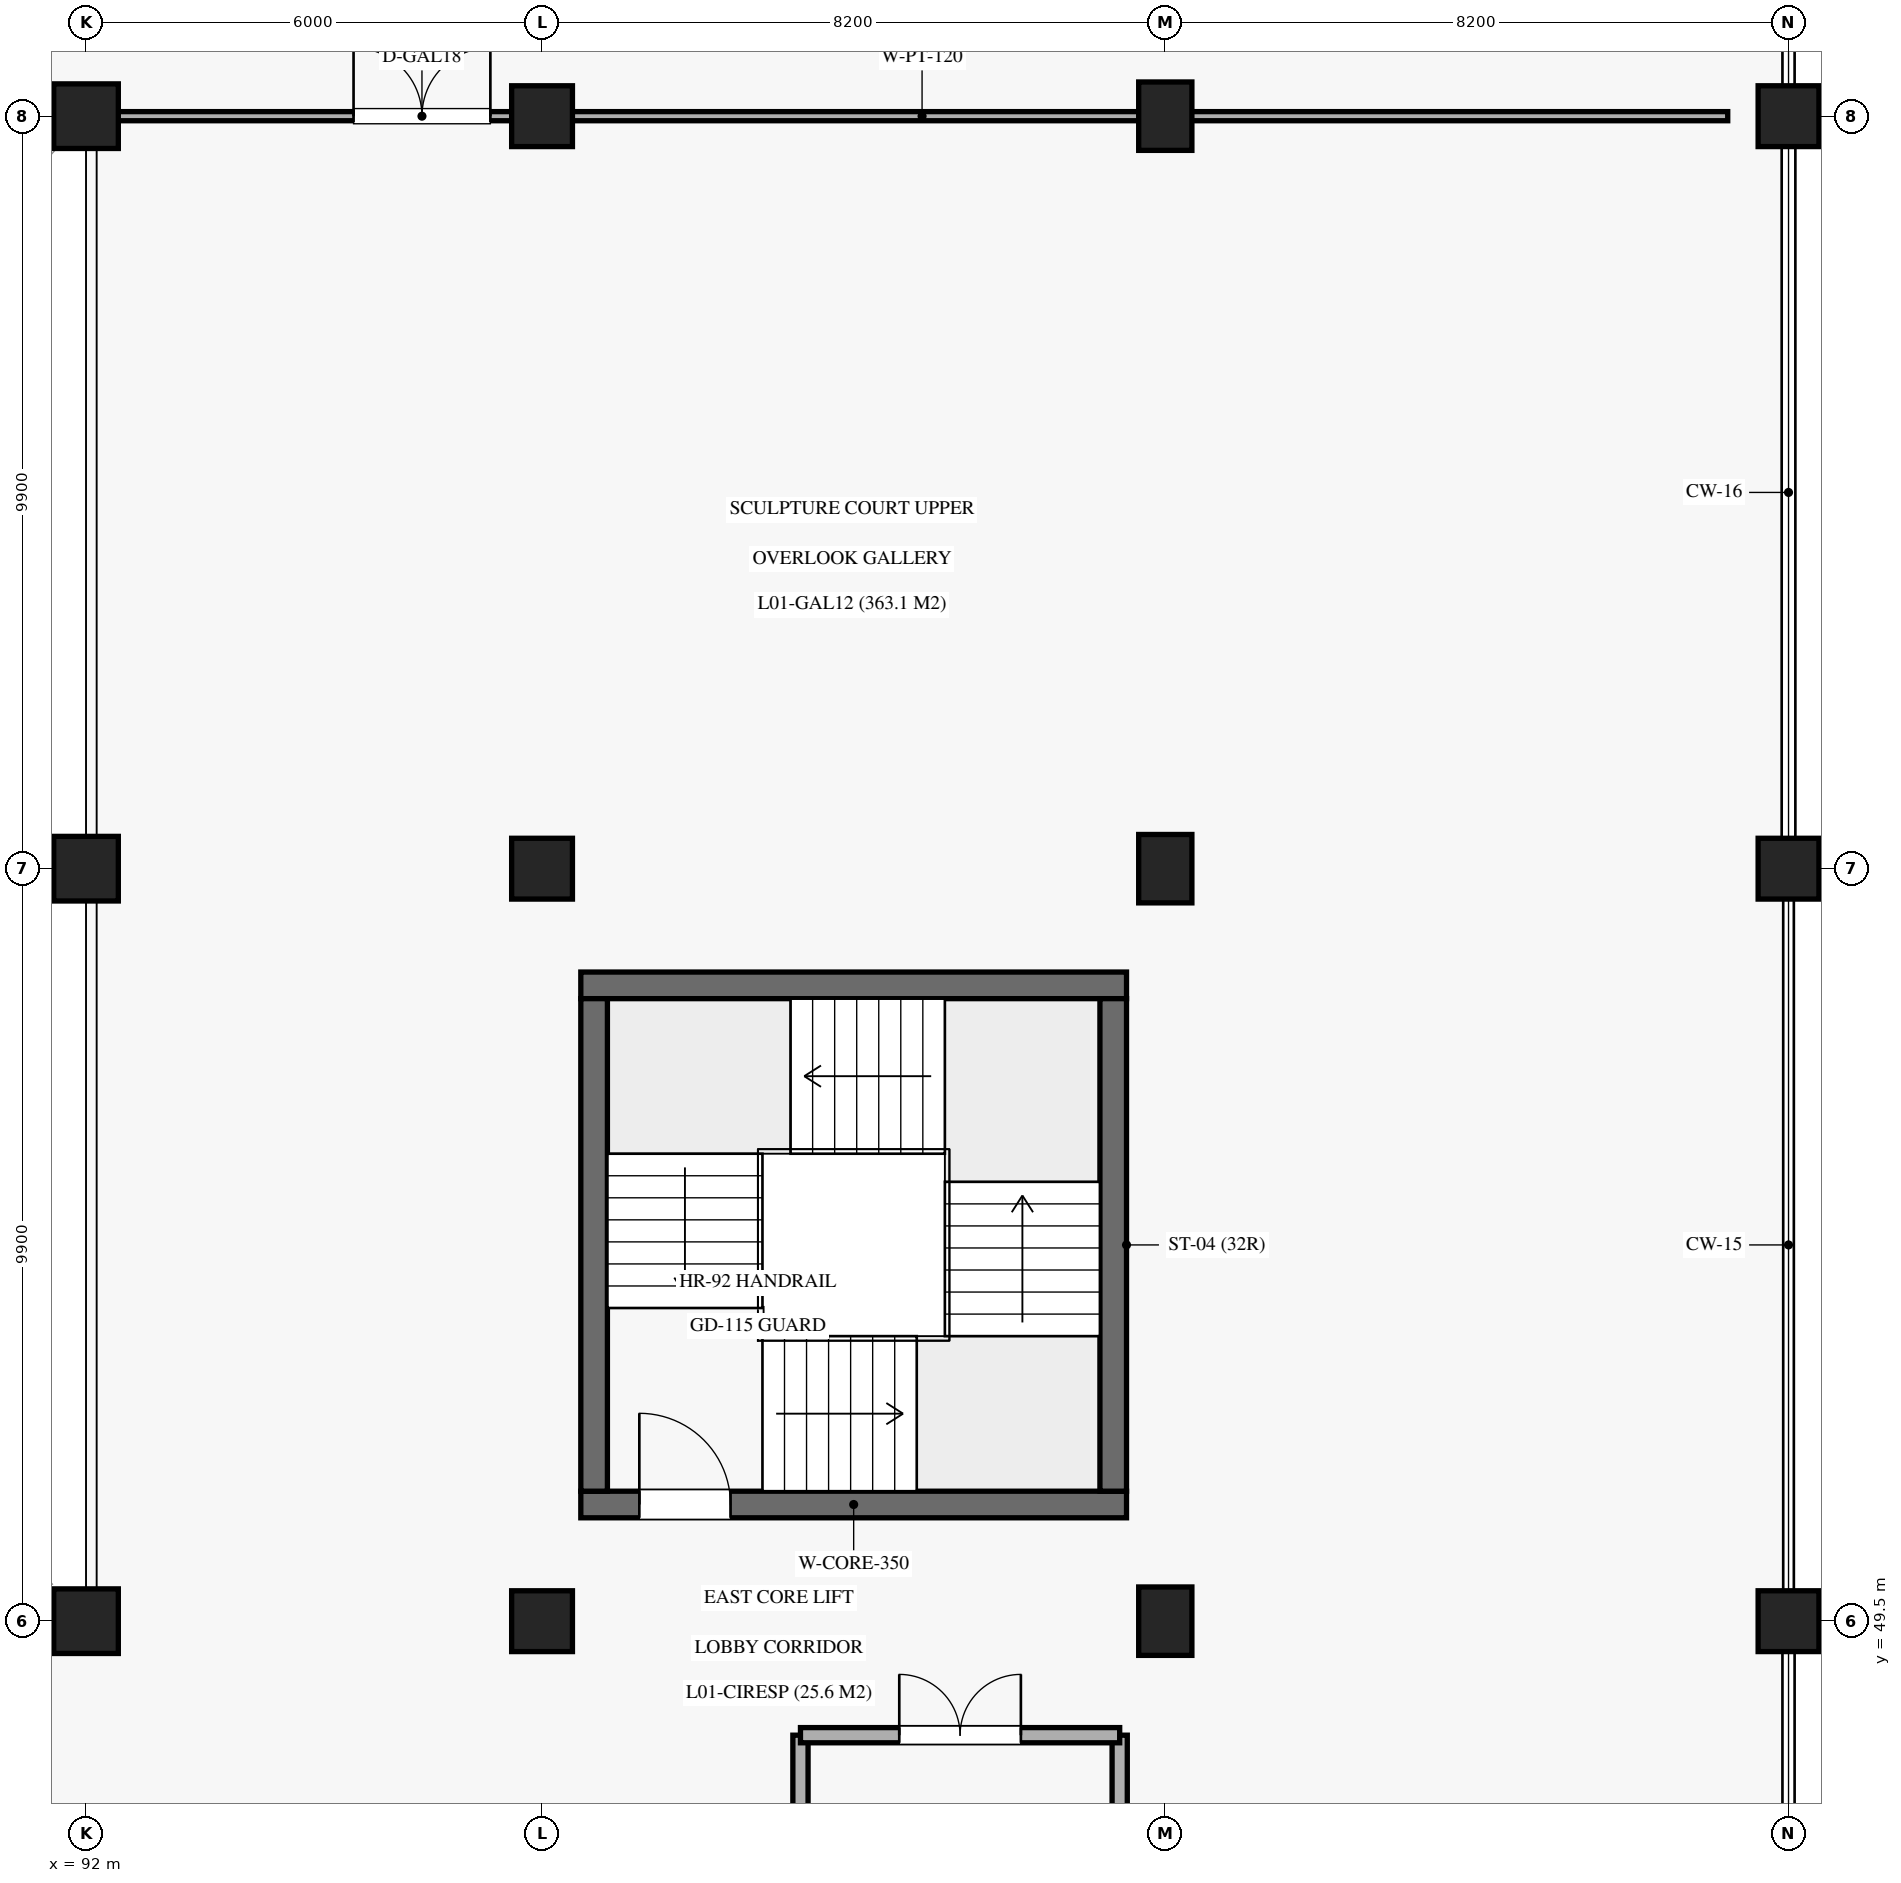
"""IFC4 building model, lengths in metres.
Left out: names, types, materials, properties, quantities, classifications, styles, units other than length and angle.
Written with IfcOpenShell. Run it as: python <this file> out.ifc"""

import sys

from ifc_helpers import new_model, si_unit, direction, frame, frame_2d, origin, origin_2d, place, context, subcontext, project, spatial, rectangle, extrude, element, fill, save


model = new_model("IFC4")
c1 = context("Model", 3, precision=1e-05, world=origin(), true_north=direction((0.0, 1.0)))
c2 = subcontext(c1, "Body", "Model", "MODEL_VIEW")
j1 = project(units=[si_unit("LENGTHUNIT", "METRE"), si_unit("PLANEANGLEUNIT", "RADIAN")], contexts=[c1])
p1 = place(None, origin())
s1 = spatial("IfcSite", under=j1, at=p1, CompositionType="ELEMENT")
p2 = place(p1, origin())
s2 = spatial("IfcBuilding", under=s1, at=p2, CompositionType="ELEMENT")
p3 = place(p2, frame((0.0, 0.0, 5.44)))
s3 = spatial("IfcBuildingStorey", under=s2, at=p3, CompositionType="ELEMENT", Elevation=5.44)
for number, where, z_axis, x_axis in (
    (1, (92.0, 49.5, 0.0), (0.0, 0.0, 1.0), (1.0, 0.0, 0.0)),
    (2, (92.0, 59.4, 0.0), (0.0, 0.0, 1.0), (1.0, 0.0, 0.0)),
    (3, (92.0, 69.3, 0.0), (0.0, 0.0, 1.0), (1.0, 0.0, 0.0)),
):
    element("IfcColumn", number, at=place(p3, frame(where, z_axis=z_axis, x_axis=x_axis)), inside=s3, PredefinedType="COLUMN", context=c2, shape_type="SweptSolid", body=[
        extrude(rectangle(XDim=0.85, YDim=0.85, at=origin_2d()), origin(), (0.0, 0.0, 1.0), 5.44),
    ])
for number, where, z_axis, x_axis in (
    (4, (98.0, 49.5, 0.0), (0.0, 0.0, 1.0), (1.0, 0.0, 0.0)),
    (5, (98.0, 59.4, 0.0), (0.0, 0.0, 1.0), (1.0, 0.0, 0.0)),
    (6, (98.0, 69.3, 0.0), (0.0, 0.0, 1.0), (1.0, 0.0, 0.0)),
):
    element("IfcColumn", number, at=place(p3, frame(where, z_axis=z_axis, x_axis=x_axis)), inside=s3, PredefinedType="COLUMN", context=c2, shape_type="SweptSolid", body=[
        extrude(rectangle(XDim=0.8, YDim=0.8, at=origin_2d()), origin(), (0.0, 0.0, 1.0), 5.44),
    ])
for number, where, z_axis, x_axis in (
    (7, (106.2, 49.5, 0.0), (0.0, 0.0, 1.0), (1.0, 0.0, 0.0)),
    (8, (106.2, 59.4, 0.0), (0.0, 0.0, 1.0), (1.0, 0.0, 0.0)),
    (9, (106.2, 69.3, 0.0), (0.0, 0.0, 1.0), (1.0, 0.0, 0.0)),
):
    element("IfcColumn", number, at=place(p3, frame(where, z_axis=z_axis, x_axis=x_axis)), inside=s3, PredefinedType="COLUMN", context=c2, shape_type="SweptSolid", body=[
        extrude(rectangle(XDim=0.7, YDim=0.9, at=origin_2d()), origin(), (0.0, 0.0, 1.0), 5.44),
    ])
for number, where, z_axis, x_axis in (
    (10, (114.4, 49.5, 0.0), (0.0, 0.0, 1.0), (1.0, 0.0, 0.0)),
    (11, (114.4, 59.4, 0.0), (0.0, 0.0, 1.0), (1.0, 0.0, 0.0)),
    (12, (114.4, 69.3, 0.0), (0.0, 0.0, 1.0), (1.0, 0.0, 0.0)),
):
    element("IfcColumn", number, at=place(p3, frame(where, z_axis=z_axis, x_axis=x_axis)), inside=s3, PredefinedType="COLUMN", context=c2, shape_type="SweptSolid", body=[
        extrude(rectangle(XDim=0.8, YDim=0.8, at=origin_2d()), origin(), (0.0, 0.0, 1.0), 5.44),
    ])
p4 = place(p3, frame((98.51, 51.035, 0.0), z_axis=(0.0, 0.0, 1.0), x_axis=(1.0, 0.0, 0.0)))
e13 = element("IfcWall", 13, at=p4, inside=s3, PredefinedType="SHEAR", context=c2, shape_type="SweptSolid", body=[
    extrude(rectangle(XDim=7.18, YDim=0.35, at=frame_2d((3.59, 0.0))), origin(), (0.0, 0.0, 1.0), 5.18),
])
p5 = place(p4, frame((0.77, 0.0, 0.0)))
e14 = element("IfcOpeningElement", 14, at=p5, cuts=e13, PredefinedType="OPENING", context=c2, shape_type="SweptSolid", body=[
    extrude(rectangle(XDim=1.2, YDim=2.2, at=frame_2d((0.6, 1.1))), frame((0.0, 0.185, 0.0), z_axis=(0.0, -1.0, 0.0), x_axis=(1.0, 0.0, 0.0)), (0.0, 0.0, 1.0), 0.37),
])
p6 = place(p3, frame((98.51, 57.865, 0.0), z_axis=(0.0, 0.0, 1.0), x_axis=(1.0, 0.0, 0.0)))
e15 = element("IfcWall", 15, at=p6, inside=s3, PredefinedType="SHEAR", context=c2, shape_type="SweptSolid", body=[
    extrude(rectangle(XDim=7.18, YDim=0.35, at=frame_2d((3.59, 0.0))), origin(), (0.0, 0.0, 1.0), 5.18),
])
for number, where, z_axis, x_axis in (
    (16, (98.685, 51.21, 0.0), (0.0, 0.0, 1.0), (0.0, 1.0, 0.0)),
    (17, (105.515, 51.21, 0.0), (0.0, 0.0, 1.0), (0.0, 1.0, 0.0)),
):
    element("IfcWall", number, at=place(p3, frame(where, z_axis=z_axis, x_axis=x_axis)), inside=s3, PredefinedType="SHEAR", context=c2, shape_type="SweptSolid", body=[
        extrude(rectangle(XDim=6.48, YDim=0.35, at=frame_2d((3.24, 0.0))), origin(), (0.0, 0.0, 1.0), 5.18),
    ])
p7 = place(p3, frame((101.4, 45.6, 0.0), z_axis=(0.0, 0.0, 1.0), x_axis=(0.0, 1.0, 0.0)))
e18 = element("IfcWall", 18, at=p7, inside=s3, PredefinedType="SOLIDWALL", context=c2, shape_type="SweptSolid", body=[
    extrude(rectangle(XDim=2.4, YDim=0.2, at=frame_2d((1.2, 0.0))), origin(), (0.0, 0.0, 1.0), 4.3),
])
p8 = place(p3, frame((105.6, 40.3, 0.0), z_axis=(0.0, 0.0, 1.0), x_axis=(0.0, 1.0, 0.0)))
e19 = element("IfcWall", 19, at=p8, inside=s3, PredefinedType="SOLIDWALL", context=c2, shape_type="SweptSolid", body=[
    extrude(rectangle(XDim=7.7, YDim=0.2, at=frame_2d((3.85, 0.0))), origin(), (0.0, 0.0, 1.0), 4.3),
])
p9 = place(p3, frame((101.4, 48.0, 0.0), z_axis=(0.0, 0.0, 1.0), x_axis=(1.0, 0.0, 0.0)))
e20 = element("IfcWall", 20, at=p9, inside=s3, PredefinedType="SOLIDWALL", context=c2, shape_type="SweptSolid", body=[
    extrude(rectangle(XDim=4.2, YDim=0.2, at=frame_2d((2.1, 0.0))), origin(), (0.0, 0.0, 1.0), 4.3),
])
p10 = place(p9, frame((1.3, 0.0, 0.0)))
e21 = element("IfcOpeningElement", 21, at=p10, cuts=e20, PredefinedType="OPENING", context=c2, shape_type="SweptSolid", body=[
    extrude(rectangle(XDim=1.6, YDim=2.2, at=frame_2d((0.8, 1.1))), frame((0.0, 0.11, 0.0), z_axis=(0.0, -1.0, 0.0), x_axis=(1.0, 0.0, 0.0)), (0.0, 0.0, 1.0), 0.22),
])
p11 = place(p3, frame((92.4, 69.3, 0.0), z_axis=(0.0, 0.0, 1.0), x_axis=(1.0, 0.0, 0.0)))
e22 = element("IfcWall", 22, at=p11, inside=s3, PredefinedType="PARTITIONING", context=c2, shape_type="SweptSolid", body=[
    extrude(rectangle(XDim=21.2, YDim=0.12, at=frame_2d((10.6, 0.0))), origin(), (0.0, 0.0, 1.0), 4.3),
])
p12 = place(p11, frame((3.12, 0.0, 0.0)))
e23 = element("IfcOpeningElement", 23, at=p12, cuts=e22, PredefinedType="OPENING", context=c2, shape_type="SweptSolid", body=[
    extrude(rectangle(XDim=1.8, YDim=2.45, at=frame_2d((0.9, 1.225))), frame((0.0, 0.07, 0.0), z_axis=(0.0, -1.0, 0.0), x_axis=(1.0, 0.0, 0.0)), (0.0, 0.0, 1.0), 0.14),
])
p13 = place(p5, origin())
e24 = element("IfcDoor", 24, at=p13, inside=s3, OperationType="SINGLE_SWING_LEFT", PredefinedType="DOOR", context=c2, shape_type="SweptSolid", body=[
    extrude(rectangle(XDim=1.2, YDim=2.2, at=frame_2d((0.6, 1.1))), frame((0.0, 0.025, 0.0), z_axis=(0.0, -1.0, 0.0), x_axis=(1.0, 0.0, 0.0)), (0.0, 0.0, 1.0), 0.05),
])
fill(e14, e24)
p14 = place(p10, origin())
e25 = element("IfcDoor", 25, at=p14, inside=s3, OperationType="DOUBLE_DOOR_SINGLE_SWING", PredefinedType="DOOR", context=c2, shape_type="SweptSolid", body=[
    extrude(rectangle(XDim=1.6, YDim=2.2, at=frame_2d((0.8, 1.1))), frame((0.0, 0.025, 0.0), z_axis=(0.0, -1.0, 0.0), x_axis=(1.0, 0.0, 0.0)), (0.0, 0.0, 1.0), 0.05),
])
fill(e21, e25)
p15 = place(p12, origin())
e26 = element("IfcDoor", 26, at=p15, inside=s3, OperationType="DOUBLE_DOOR_SINGLE_SWING", PredefinedType="DOOR", context=c2, shape_type="SweptSolid", body=[
    extrude(rectangle(XDim=1.8, YDim=2.45, at=frame_2d((0.9, 1.225))), frame((0.0, 0.025, 0.0), z_axis=(0.0, -1.0, 0.0), x_axis=(1.0, 0.0, 0.0)), (0.0, 0.0, 1.0), 0.05),
])
fill(e23, e26)
save(model, sys.argv[1])
